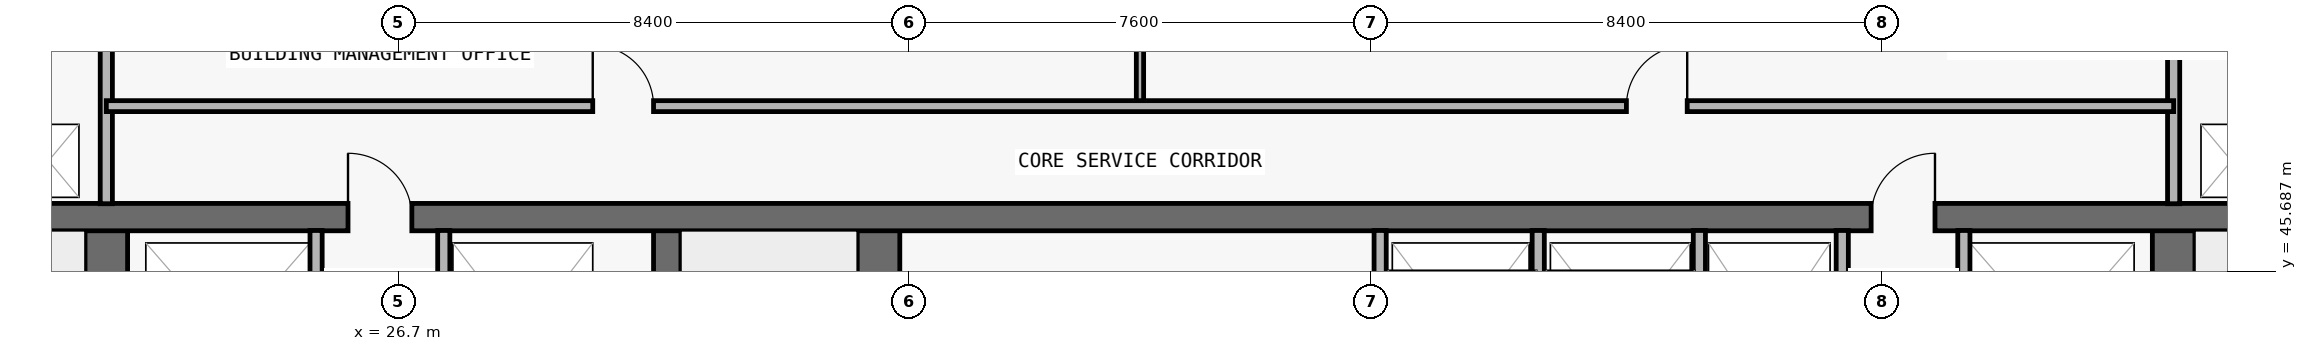
"""IFC4 building model, lengths in metres.
Left out: names, types, materials, properties, quantities, classifications, styles, units other than length and angle.
Written with IfcOpenShell. Run it as: python <this file> out.ifc"""

import sys

from ifc_helpers import new_model, si_unit, direction, frame, frame_2d, origin, place, context, subcontext, project, spatial, rectangle, extrude, element, fill, save


model = new_model("IFC4")
c1 = context("Model", 3, precision=1e-05, world=origin(), true_north=direction((0.0, 1.0)))
c2 = subcontext(c1, "Body", "Model", "MODEL_VIEW")
j1 = project(units=[si_unit("LENGTHUNIT", "METRE"), si_unit("PLANEANGLEUNIT", "RADIAN")], contexts=[c1])
p1 = place(None, origin())
s1 = spatial("IfcSite", under=j1, at=p1, CompositionType="ELEMENT")
p2 = place(p1, origin())
s2 = spatial("IfcBuilding", under=s1, at=p2, CompositionType="ELEMENT")
p3 = place(p2, frame((0.0, 0.0, 112.5)))
s3 = spatial("IfcBuildingStorey", under=s2, at=p3, CompositionType="ELEMENT", Elevation=112.5)
p4 = place(p3, frame((21.9, 36.95, 0.0), z_axis=(0.0, 0.0, 1.0), x_axis=(0.0, 1.0, 0.0)))
e1 = element("IfcWall", 1, at=p4, inside=s3, PredefinedType="SHEAR", context=c2, shape_type="SweptSolid", body=[
    extrude(rectangle(XDim=9.625, YDim=0.7, at=frame_2d((4.812, 0.0))), origin(), (0.0, 0.0, 1.0), 3.05),
])
p5 = place(p4, frame((0.6, 0.0, 0.0)))
e2 = element("IfcOpeningElement", 2, at=p5, cuts=e1, PredefinedType="OPENING", context=c2, shape_type="SweptSolid", body=[
    extrude(rectangle(XDim=1.1, YDim=2.15, at=frame_2d((0.55, 1.075))), frame((0.0, 0.36, 0.0), z_axis=(0.0, -1.0, 0.0), x_axis=(1.0, 0.0, 0.0)), (0.0, 0.0, 1.0), 0.72),
])
p6 = place(p3, frame((55.9, 36.95, 0.0), z_axis=(0.0, 0.0, 1.0), x_axis=(0.0, 1.0, 0.0)))
e3 = element("IfcWall", 3, at=p6, inside=s3, PredefinedType="SHEAR", context=c2, shape_type="SweptSolid", body=[
    extrude(rectangle(XDim=9.625, YDim=0.7, at=frame_2d((4.812, 0.0))), origin(), (0.0, 0.0, 1.0), 3.05),
])
p7 = place(p6, frame((0.6, 0.0, 0.0)))
e4 = element("IfcOpeningElement", 4, at=p7, cuts=e3, PredefinedType="OPENING", context=c2, shape_type="SweptSolid", body=[
    extrude(rectangle(XDim=1.1, YDim=2.15, at=frame_2d((0.55, 1.075))), frame((0.0, 0.36, 0.0), z_axis=(0.0, -1.0, 0.0), x_axis=(1.0, 0.0, 0.0)), (0.0, 0.0, 1.0), 0.72),
])
p8 = place(p3, frame((31.125, 36.95, 0.0), z_axis=(0.0, 0.0, 1.0), x_axis=(0.0, 1.0, 0.0)))
e5 = element("IfcWall", 5, at=p8, inside=s3, PredefinedType="SHEAR", context=c2, shape_type="SweptSolid", body=[
    extrude(rectangle(XDim=9.625, YDim=0.45, at=frame_2d((4.812, 0.0))), origin(), (0.0, 0.0, 1.0), 3.05),
])
p9 = place(p3, frame((34.6, 36.95, 0.0), z_axis=(0.0, 0.0, 1.0), x_axis=(0.0, 1.0, 0.0)))
e6 = element("IfcWall", 6, at=p9, inside=s3, PredefinedType="SHEAR", context=c2, shape_type="SweptSolid", body=[
    extrude(rectangle(XDim=9.625, YDim=0.7, at=frame_2d((4.812, 0.0))), origin(), (0.0, 0.0, 1.0), 3.05),
])
p10 = place(p3, frame((18.25, 46.575, 0.0), z_axis=(0.0, 0.0, 1.0), x_axis=(1.0, 0.0, 0.0)))
e7 = element("IfcWall", 7, at=p10, inside=s3, PredefinedType="SHEAR", context=c2, shape_type="SweptSolid", body=[
    extrude(rectangle(XDim=41.3, YDim=0.45, at=frame_2d((20.65, 0.0))), origin(), (0.0, 0.0, 1.0), 3.05),
])
p11 = place(p10, frame((7.625, 0.0, 0.0)))
e8 = element("IfcOpeningElement", 8, at=p11, cuts=e7, PredefinedType="OPENING", context=c2, shape_type="SweptSolid", body=[
    extrude(rectangle(XDim=1.05, YDim=2.15, at=frame_2d((0.525, 1.075))), frame((0.0, 0.235, 0.0), z_axis=(0.0, -1.0, 0.0), x_axis=(1.0, 0.0, 0.0)), (0.0, 0.0, 1.0), 0.47),
])
p12 = place(p10, frame((32.675, 0.0, 0.0)))
e9 = element("IfcOpeningElement", 9, at=p12, cuts=e7, PredefinedType="OPENING", context=c2, shape_type="SweptSolid", body=[
    extrude(rectangle(XDim=1.05, YDim=2.15, at=frame_2d((0.525, 1.075))), frame((0.0, 0.235, 0.0), z_axis=(0.0, -1.0, 0.0), x_axis=(1.0, 0.0, 0.0)), (0.0, 0.0, 1.0), 0.47),
])
p13 = place(p3, frame((21.9, 46.795, 0.0), z_axis=(0.0, 0.0, 1.0), x_axis=(0.0, 1.0, 0.0)))
e10 = element("IfcWall", 10, at=p13, inside=s3, PredefinedType="PARTITIONING", context=c2, shape_type="SweptSolid", body=[
    extrude(rectangle(XDim=3.16, YDim=0.2, at=frame_2d((1.58, 0.0))), origin(), (0.0, 0.0, 1.0), 3.05),
])
for number, where, z_axis, x_axis in (
    (11, (25.35, 43.17, 0.0), (0.0, 0.0, 1.0), (0.0, 1.0, 0.0)),
    (12, (27.45, 43.17, 0.0), (0.0, 0.0, 1.0), (0.0, 1.0, 0.0)),
):
    element("IfcWall", number, at=place(p3, frame(where, z_axis=z_axis, x_axis=x_axis)), inside=s3, PredefinedType="PARTITIONING", context=c2, shape_type="SweptSolid", body=[
        extrude(rectangle(XDim=3.185, YDim=0.2, at=frame_2d((1.593, 0.0))), origin(), (0.0, 0.0, 1.0), 3.05),
    ])
p14 = place(p3, frame((38.9, 48.4, 0.0), z_axis=(0.0, 0.0, 1.0), x_axis=(0.0, 1.0, 0.0)))
e13 = element("IfcWall", 13, at=p14, inside=s3, PredefinedType="PARTITIONING", context=c2, shape_type="SweptSolid", body=[
    extrude(rectangle(XDim=1.555, YDim=0.12, at=frame_2d((0.778, 0.0))), origin(), (0.0, 0.0, 1.0), 3.05),
])
for number, where, z_axis, x_axis in (
    (14, (42.85, 43.17, 0.0), (0.0, 0.0, 1.0), (0.0, 1.0, 0.0)),
    (15, (45.45, 43.17, 0.0), (0.0, 0.0, 1.0), (0.0, 1.0, 0.0)),
    (16, (48.1, 43.17, 0.0), (0.0, 0.0, 1.0), (0.0, 1.0, 0.0)),
    (17, (50.45, 43.17, 0.0), (0.0, 0.0, 1.0), (0.0, 1.0, 0.0)),
    (18, (52.45, 43.17, 0.0), (0.0, 0.0, 1.0), (0.0, 1.0, 0.0)),
):
    element("IfcWall", number, at=place(p3, frame(where, z_axis=z_axis, x_axis=x_axis)), inside=s3, PredefinedType="PARTITIONING", context=c2, shape_type="SweptSolid", body=[
        extrude(rectangle(XDim=3.185, YDim=0.2, at=frame_2d((1.593, 0.0))), origin(), (0.0, 0.0, 1.0), 3.05),
    ])
p15 = place(p3, frame((55.9, 46.795, 0.0), z_axis=(0.0, 0.0, 1.0), x_axis=(0.0, 1.0, 0.0)))
e19 = element("IfcWall", 19, at=p15, inside=s3, PredefinedType="PARTITIONING", context=c2, shape_type="SweptSolid", body=[
    extrude(rectangle(XDim=3.16, YDim=0.2, at=frame_2d((1.58, 0.0))), origin(), (0.0, 0.0, 1.0), 3.05),
])
p16 = place(p3, frame((21.9, 48.4, 0.0), z_axis=(0.0, 0.0, 1.0), x_axis=(1.0, 0.0, 0.0)))
e20 = element("IfcWall", 20, at=p16, inside=s3, PredefinedType="PARTITIONING", context=c2, shape_type="SweptSolid", body=[
    extrude(rectangle(XDim=34.0, YDim=0.18, at=frame_2d((17.0, 0.0))), origin(), (0.0, 0.0, 1.0), 3.05),
])
p17 = place(p16, frame((8.0, 0.0, 0.0)))
e21 = element("IfcOpeningElement", 21, at=p17, cuts=e20, PredefinedType="OPENING", context=c2, shape_type="SweptSolid", body=[
    extrude(rectangle(XDim=1.0, YDim=2.2, at=frame_2d((0.5, 1.1))), frame((0.0, 0.1, 0.0), z_axis=(0.0, -1.0, 0.0), x_axis=(1.0, 0.0, 0.0)), (0.0, 0.0, 1.0), 0.2),
])
p18 = place(p16, frame((25.0, 0.0, 0.0)))
e22 = element("IfcOpeningElement", 22, at=p18, cuts=e20, PredefinedType="OPENING", context=c2, shape_type="SweptSolid", body=[
    extrude(rectangle(XDim=1.0, YDim=2.2, at=frame_2d((0.5, 1.1))), frame((0.0, 0.1, 0.0), z_axis=(0.0, -1.0, 0.0), x_axis=(1.0, 0.0, 0.0)), (0.0, 0.0, 1.0), 0.2),
])
p19 = place(p11, origin())
e23 = element("IfcDoor", 23, at=p19, inside=s3, OperationType="SINGLE_SWING_LEFT", PredefinedType="DOOR", context=c2, shape_type="SweptSolid", body=[
    extrude(rectangle(XDim=1.05, YDim=2.15, at=frame_2d((0.525, 1.075))), frame((0.0, 0.025, 0.0), z_axis=(0.0, -1.0, 0.0), x_axis=(1.0, 0.0, 0.0)), (0.0, 0.0, 1.0), 0.05),
])
fill(e8, e23)
p20 = place(p12, origin())
e24 = element("IfcDoor", 24, at=p20, inside=s3, OperationType="SINGLE_SWING_RIGHT", PredefinedType="DOOR", context=c2, shape_type="SweptSolid", body=[
    extrude(rectangle(XDim=1.05, YDim=2.15, at=frame_2d((0.525, 1.075))), frame((0.0, 0.025, 0.0), z_axis=(0.0, -1.0, 0.0), x_axis=(1.0, 0.0, 0.0)), (0.0, 0.0, 1.0), 0.05),
])
fill(e9, e24)
p21 = place(p17, origin())
e25 = element("IfcDoor", 25, at=p21, inside=s3, OperationType="SINGLE_SWING_LEFT", PredefinedType="DOOR", context=c2, shape_type="SweptSolid", body=[
    extrude(rectangle(XDim=1.0, YDim=2.2, at=frame_2d((0.5, 1.1))), frame((0.0, 0.025, 0.0), z_axis=(0.0, -1.0, 0.0), x_axis=(1.0, 0.0, 0.0)), (0.0, 0.0, 1.0), 0.05),
])
fill(e21, e25)
p22 = place(p18, origin())
e26 = element("IfcDoor", 26, at=p22, inside=s3, OperationType="SINGLE_SWING_RIGHT", PredefinedType="DOOR", context=c2, shape_type="SweptSolid", body=[
    extrude(rectangle(XDim=1.0, YDim=2.2, at=frame_2d((0.5, 1.1))), frame((0.0, 0.025, 0.0), z_axis=(0.0, -1.0, 0.0), x_axis=(1.0, 0.0, 0.0)), (0.0, 0.0, 1.0), 0.05),
])
fill(e22, e26)
save(model, sys.argv[1])
